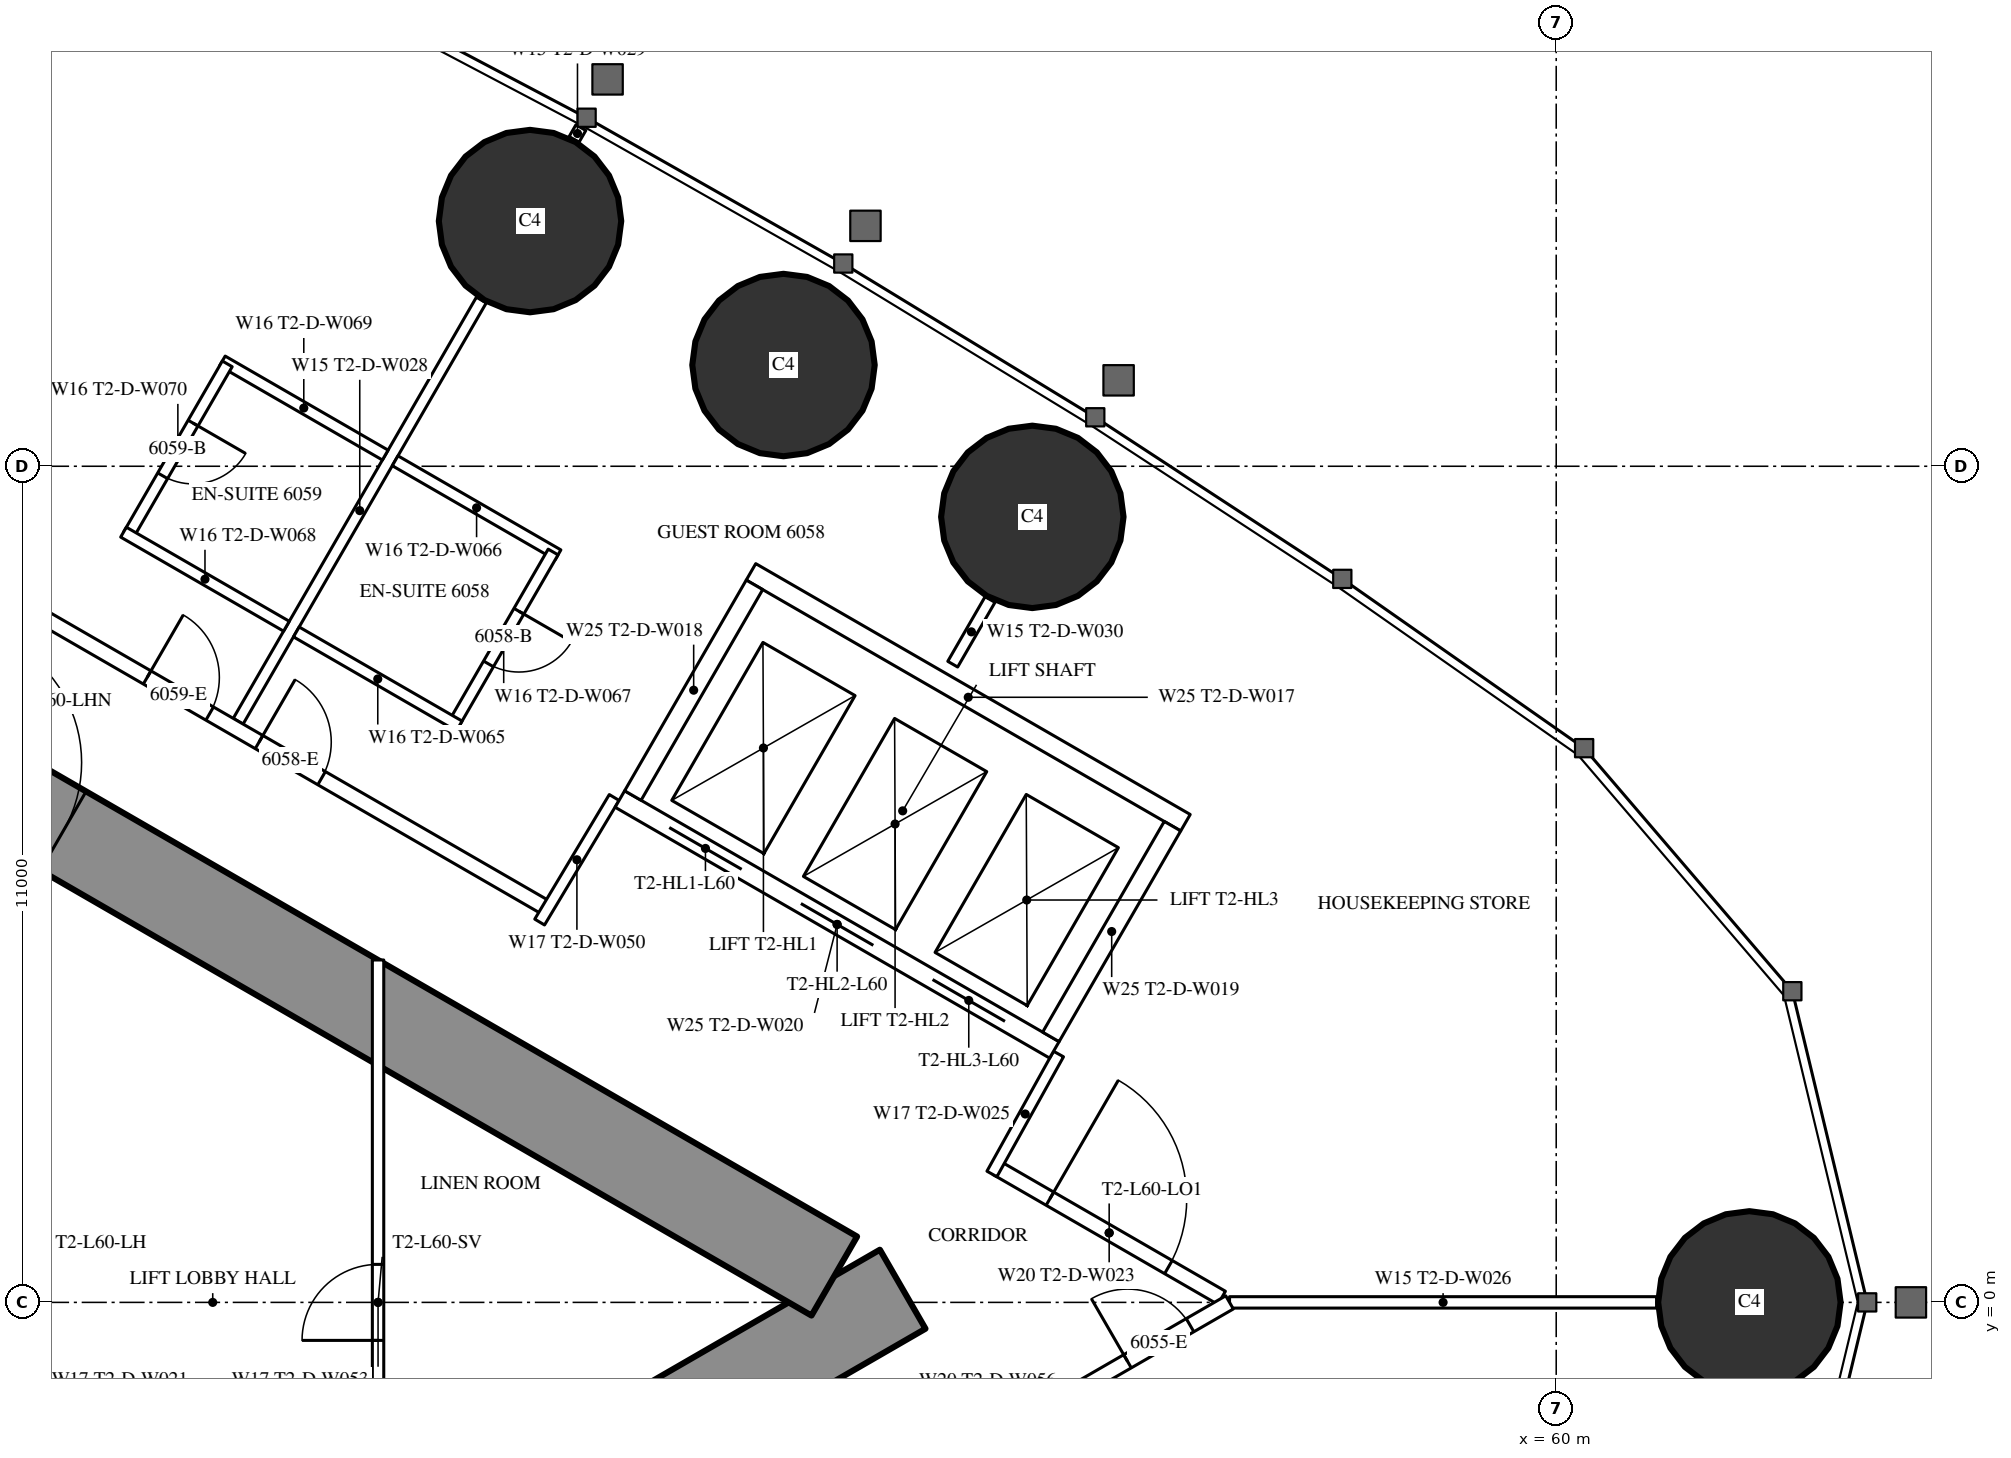
"""IFC4 building model, lengths in metres.
Left out: names, types, materials, properties, quantities, classifications, styles, units other than length and angle.
Written with IfcOpenShell. Run it as: python <this file> out.ifc"""

import sys

from ifc_helpers import new_model, si_unit, direction, frame, frame_2d, origin, origin_2d, place, context, subcontext, project, spatial, rectangle, circle, extrude, element, fill, save


model = new_model("IFC4")
c1 = context("Model", 3, precision=1e-05, world=origin(), true_north=direction((0.0, 1.0)))
c2 = subcontext(c1, "Body", "Model", "MODEL_VIEW")
j1 = project(units=[si_unit("LENGTHUNIT", "METRE"), si_unit("PLANEANGLEUNIT", "RADIAN")], contexts=[c1])
p1 = place(None, origin())
s1 = spatial("IfcSite", under=j1, at=p1, CompositionType="ELEMENT")
p2 = place(p1, origin())
s2 = spatial("IfcBuilding", under=s1, at=p2, CompositionType="ELEMENT")
p3 = place(p2, frame((0.0, 0.0, 226.1)))
s3 = spatial("IfcBuildingStorey", under=s2, at=p3, CompositionType="ELEMENT", Elevation=226.1)
for number, where, z_axis, x_axis in (
    (1, (62.542, 0.0, 0.0), (0.0, 0.0, 1.0), (1.0, 0.0, 0.0)),
    (2, (53.108, 10.334, 0.0), (0.0, 0.0, 1.0), (1.0, 0.0, 0.0)),
    (3, (49.834, 12.332, 0.0), (0.0, 0.0, 1.0), (1.0, 0.0, 0.0)),
    (4, (46.499, 14.226, 0.0), (0.0, 0.0, 1.0), (1.0, 0.0, 0.0)),
):
    element("IfcColumn", number, at=place(p3, frame(where, z_axis=z_axis, x_axis=x_axis)), inside=s3, PredefinedType="COLUMN", context=c2, shape_type="SweptSolid", body=[
        extrude(circle(Radius=1.2, at=origin_2d()), origin(), (0.0, 0.0, 1.0), 3.6),
    ])
p4 = place(p3, frame((27.2, -13.8, 0.0), z_axis=(0.0, 0.0, 1.0), x_axis=(0.866027159892, 0.499996958321, 0.0)))
e5 = element("IfcWall", 5, at=p4, inside=s3, PredefinedType="SHEAR", context=c2, shape_type="SweptSolid", body=[
    extrude(rectangle(XDim=27.947, YDim=1.2, at=frame_2d((13.973, 0.0))), origin(), (0.0, 0.0, 1.0), 3.6),
])
p5 = place(p4, frame((4.6, 0.0, 0.0)))
e6 = element("IfcOpeningElement", 6, at=p5, cuts=e5, PredefinedType="OPENING", context=c2, shape_type="SweptSolid", body=[
    extrude(rectangle(XDim=1.0, YDim=2.2, at=frame_2d((0.5, 1.1))), frame((0.0, 0.61, 0.0), z_axis=(0.0, -1.0, 0.0), x_axis=(1.0, 0.0, 0.0)), (0.0, 0.0, 1.0), 1.22),
])
p6 = place(p4, frame((13.395, 0.0, 0.0)))
e7 = element("IfcOpeningElement", 7, at=p6, cuts=e5, PredefinedType="OPENING", context=c2, shape_type="SweptSolid", body=[
    extrude(rectangle(XDim=1.8, YDim=2.2, at=frame_2d((0.9, 1.1))), frame((0.0, 0.61, 0.0), z_axis=(0.0, -1.0, 0.0), x_axis=(1.0, 0.0, 0.0)), (0.0, 0.0, 1.0), 1.22),
])
p7 = place(p3, frame((27.2, 13.8, 0.0), z_axis=(0.0, 0.0, 1.0), x_axis=(0.866024515034, -0.500001539357, 0.0)))
e8 = element("IfcWall", 8, at=p7, inside=s3, PredefinedType="SHEAR", context=c2, shape_type="SweptSolid", body=[
    extrude(rectangle(XDim=26.907, YDim=1.2, at=frame_2d((13.454, 0.0))), origin(), (0.0, 0.0, 1.0), 3.6),
])
p8 = place(p7, frame((4.6, 0.0, 0.0)))
e9 = element("IfcOpeningElement", 9, at=p8, cuts=e8, PredefinedType="OPENING", context=c2, shape_type="SweptSolid", body=[
    extrude(rectangle(XDim=1.0, YDim=2.2, at=frame_2d((0.5, 1.1))), frame((0.0, 0.61, 0.0), z_axis=(0.0, -1.0, 0.0), x_axis=(1.0, 0.0, 0.0)), (0.0, 0.0, 1.0), 1.22),
])
p9 = place(p7, frame((13.395, 0.0, 0.0)))
e10 = element("IfcOpeningElement", 10, at=p9, cuts=e8, PredefinedType="OPENING", context=c2, shape_type="SweptSolid", body=[
    extrude(rectangle(XDim=1.8, YDim=2.2, at=frame_2d((0.9, 1.1))), frame((0.0, 0.61, 0.0), z_axis=(0.0, -1.0, 0.0), x_axis=(1.0, 0.0, 0.0)), (0.0, 0.0, 1.0), 1.22),
])
p10 = place(p3, frame((42.66, 7.646, 0.0), z_axis=(0.0, 0.0, 1.0), x_axis=(0.499996592859, 0.866027370889, 0.0)))
e11 = element("IfcWall", 11, at=p10, inside=s3, PredefinedType="PARTITIONING", context=c2, shape_type="SweptSolid", body=[
    extrude(rectangle(XDim=6.398, YDim=0.15, at=frame_2d((3.199, 0.0))), origin(), (0.0, 0.0, 1.0), 2.45),
])
p11 = place(p3, frame((47.079, 15.3, 0.0), z_axis=(0.0, 0.0, 1.0), x_axis=(0.499212083968, 0.866479829667, 0.0)))
e12 = element("IfcWall", 12, at=p11, inside=s3, PredefinedType="PARTITIONING", context=c2, shape_type="SweptSolid", body=[
    extrude(rectangle(XDim=0.179, YDim=0.15, at=frame_2d((0.09, 0.0))), origin(), (0.0, 0.0, 1.0), 2.45),
])
p12 = place(p3, frame((55.702, 0.0, 0.0), z_axis=(0.0, 0.0, 1.0), x_axis=(1.0, 0.0, 0.0)))
e13 = element("IfcWall", 13, at=p12, inside=s3, PredefinedType="PARTITIONING", context=c2, shape_type="SweptSolid", body=[
    extrude(rectangle(XDim=5.619, YDim=0.15, at=frame_2d((2.81, 0.0))), origin(), (0.0, 0.0, 1.0), 2.45),
])
p13 = place(p3, frame((52.06, 8.396, 0.0), z_axis=(0.0, 0.0, 1.0), x_axis=(0.500095379624, 0.865970329329, 0.0)))
e14 = element("IfcWall", 14, at=p13, inside=s3, PredefinedType="PARTITIONING", context=c2, shape_type="SweptSolid", body=[
    extrude(rectangle(XDim=0.982, YDim=0.15, at=frame_2d((0.491, 0.0))), origin(), (0.0, 0.0, 1.0), 3.35),
])
p14 = place(p3, frame((28.959, 15.44, 0.0), z_axis=(0.0, 0.0, 1.0), x_axis=(0.866028936079, -0.499993881836, 0.0)))
e15 = element("IfcWall", 15, at=p14, inside=s3, PredefinedType="PARTITIONING", context=c2, shape_type="SweptSolid", body=[
    extrude(rectangle(XDim=20.503, YDim=0.2, at=frame_2d((10.251, 0.0))), origin(), (0.0, 0.0, 1.0), 3.35),
])
p15 = place(p14, frame((16.137, 0.0, 0.0)))
e16 = element("IfcOpeningElement", 16, at=p15, cuts=e15, PredefinedType="OPENING", context=c2, shape_type="SweptSolid", body=[
    extrude(rectangle(XDim=0.95, YDim=2.2, at=frame_2d((0.475, 1.1))), frame((0.0, 0.11, 0.0), z_axis=(0.0, -1.0, 0.0), x_axis=(1.0, 0.0, 0.0)), (0.0, 0.0, 1.0), 0.22),
])
p16 = place(p14, frame((14.437, 0.0, 0.0)))
e17 = element("IfcOpeningElement", 17, at=p16, cuts=e15, PredefinedType="OPENING", context=c2, shape_type="SweptSolid", body=[
    extrude(rectangle(XDim=0.95, YDim=2.2, at=frame_2d((0.475, 1.1))), frame((0.0, 0.11, 0.0), z_axis=(0.0, -1.0, 0.0), x_axis=(1.0, 0.0, 0.0)), (0.0, 0.0, 1.0), 0.22),
])
p17 = place(p14, frame((2.244, 0.0, 0.0)))
e18 = element("IfcOpeningElement", 18, at=p17, cuts=e15, PredefinedType="OPENING", context=c2, shape_type="SweptSolid", body=[
    extrude(rectangle(XDim=1.8, YDim=2.04, at=frame_2d((0.9, 1.02))), frame((0.0, 0.11, 0.0), z_axis=(0.0, -1.0, 0.0), x_axis=(1.0, 0.0, 0.0)), (0.0, 0.0, 1.0), 0.22),
])
p18 = place(p3, frame((52.639, 1.769, 0.0), z_axis=(0.0, 0.0, 1.0), x_axis=(0.866027340901, -0.4999966448, 0.0)))
e19 = element("IfcWall", 19, at=p18, inside=s3, PredefinedType="PARTITIONING", context=c2, shape_type="SweptSolid", body=[
    extrude(rectangle(XDim=3.417, YDim=0.2, at=frame_2d((1.708, 0.0))), origin(), (0.0, 0.0, 1.0), 3.35),
])
p19 = place(p18, frame((0.809, 0.0, 0.0)))
e20 = element("IfcOpeningElement", 20, at=p19, cuts=e19, PredefinedType="OPENING", context=c2, shape_type="SweptSolid", body=[
    extrude(rectangle(XDim=1.8, YDim=2.2, at=frame_2d((0.9, 1.1))), frame((0.0, 0.11, 0.0), z_axis=(0.0, -1.0, 0.0), x_axis=(1.0, 0.0, 0.0)), (0.0, 0.0, 1.0), 0.22),
])
p20 = place(p3, frame((47.606, 6.642, 0.0), z_axis=(0.0, 0.0, 1.0), x_axis=(-0.51353662755, -0.858067673418, 0.0)))
e21 = element("IfcWall", 21, at=p20, inside=s3, PredefinedType="PARTITIONING", context=c2, shape_type="SweptSolid", body=[
    extrude(rectangle(XDim=1.91, YDim=0.15, at=frame_2d((0.955, 0.0))), origin(), (0.0, 0.0, 1.0), 3.35),
])
p21 = place(p3, frame((52.576, 1.689, 0.0), z_axis=(0.0, 0.0, 1.0), x_axis=(0.485424724123, 0.874278466629, 0.0)))
e22 = element("IfcWall", 22, at=p21, inside=s3, PredefinedType="PARTITIONING", context=c2, shape_type="SweptSolid", body=[
    extrude(rectangle(XDim=1.805, YDim=0.15, at=frame_2d((0.903, 0.0))), origin(), (0.0, 0.0, 1.0), 3.35),
])
p22 = place(p3, frame((44.725, 11.072, 0.0), z_axis=(0.0, 0.0, 1.0), x_axis=(0.866006523861, -0.500032699561, 0.0)))
e23 = element("IfcWall", 23, at=p22, inside=s3, PredefinedType="PARTITIONING", context=c2, shape_type="SweptSolid", body=[
    extrude(rectangle(XDim=2.475, YDim=0.15, at=frame_2d((1.237, 0.0))), origin(), (0.0, 0.0, 1.0), 3.35),
])
p23 = place(p3, frame((45.503, 7.621, 0.0), z_axis=(0.0, 0.0, 1.0), x_axis=(0.500006934395, 0.866021400173, 0.0)))
e24 = element("IfcWall", 24, at=p23, inside=s3, PredefinedType="PARTITIONING", context=c2, shape_type="SweptSolid", body=[
    extrude(rectangle(XDim=2.6, YDim=0.15, at=frame_2d((1.3, 0.0))), origin(), (0.0, 0.0, 1.0), 3.35),
])
p24 = place(p23, frame((0.9, 0.0, 0.0)))
e25 = element("IfcOpeningElement", 25, at=p24, cuts=e24, PredefinedType="OPENING", context=c2, shape_type="SweptSolid", body=[
    extrude(rectangle(XDim=0.8, YDim=2.2, at=frame_2d((0.4, 1.1))), frame((0.0, 0.085, 0.0), z_axis=(0.0, -1.0, 0.0), x_axis=(1.0, 0.0, 0.0)), (0.0, 0.0, 1.0), 0.17),
])
p25 = place(p3, frame((43.425, 8.821, 0.0), z_axis=(0.0, 0.0, 1.0), x_axis=(0.866006523861, -0.500032699561, 0.0)))
e26 = element("IfcWall", 26, at=p25, inside=s3, PredefinedType="PARTITIONING", context=c2, shape_type="SweptSolid", body=[
    extrude(rectangle(XDim=2.475, YDim=0.15, at=frame_2d((1.237, 0.0))), origin(), (0.0, 0.0, 1.0), 2.5),
])
p26 = place(p3, frame((42.451, 12.385, 0.0), z_axis=(0.0, 0.0, 1.0), x_axis=(0.866031185235, -0.4999899861, 0.0)))
e27 = element("IfcWall", 27, at=p26, inside=s3, PredefinedType="PARTITIONING", context=c2, shape_type="SweptSolid", body=[
    extrude(rectangle(XDim=2.475, YDim=0.15, at=frame_2d((1.238, 0.0))), origin(), (0.0, 0.0, 1.0), 3.35),
])
p27 = place(p3, frame((41.216, 10.095, 0.0), z_axis=(0.0, 0.0, 1.0), x_axis=(0.499936506574, 0.866062058628, 0.0)))
e28 = element("IfcWall", 28, at=p27, inside=s3, PredefinedType="PARTITIONING", context=c2, shape_type="SweptSolid", body=[
    extrude(rectangle(XDim=2.6, YDim=0.15, at=frame_2d((1.3, 0.0))), origin(), (0.0, 0.0, 1.0), 3.35),
])
p28 = place(p27, frame((0.9, 0.0, 0.0)))
e29 = element("IfcOpeningElement", 29, at=p28, cuts=e28, PredefinedType="OPENING", context=c2, shape_type="SweptSolid", body=[
    extrude(rectangle(XDim=0.8, YDim=2.2, at=frame_2d((0.4, 1.1))), frame((0.0, 0.085, 0.0), z_axis=(0.0, -1.0, 0.0), x_axis=(1.0, 0.0, 0.0)), (0.0, 0.0, 1.0), 0.17),
])
p29 = place(p3, frame((41.151, 10.133, 0.0), z_axis=(0.0, 0.0, 1.0), x_axis=(0.866006523861, -0.500032699561, 0.0)))
e30 = element("IfcWall", 30, at=p29, inside=s3, PredefinedType="PARTITIONING", context=c2, shape_type="SweptSolid", body=[
    extrude(rectangle(XDim=2.475, YDim=0.15, at=frame_2d((1.237, 0.0))), origin(), (0.0, 0.0, 1.0), 2.5),
])
p30 = place(p3, frame((49.335, -3.676, 0.0), z_axis=(0.0, 0.0, 1.0), x_axis=(0.866021344046, 0.500007031608, 0.0)))
e31 = element("IfcWall", 31, at=p30, inside=s3, PredefinedType="PARTITIONING", context=c2, shape_type="SweptSolid", body=[
    extrude(rectangle(XDim=7.352, YDim=0.2, at=frame_2d((3.676, 0.0))), origin(), (0.0, 0.0, 1.0), 3.35),
])
p31 = place(p30, frame((5.802, 0.0, 0.0)))
e32 = element("IfcOpeningElement", 32, at=p31, cuts=e31, PredefinedType="OPENING", context=c2, shape_type="SweptSolid", body=[
    extrude(rectangle(XDim=0.95, YDim=2.2, at=frame_2d((0.475, 1.1))), frame((0.0, 0.11, 0.0), z_axis=(0.0, -1.0, 0.0), x_axis=(1.0, 0.0, 0.0)), (0.0, 0.0, 1.0), 0.22),
])
p32 = place(p3, frame((44.5, -4.505, 0.0), z_axis=(0.0, 0.0, 1.0), x_axis=(0.0, 1.0, 0.0)))
e33 = element("IfcWall", 33, at=p32, inside=s3, PredefinedType="PARTITIONING", context=c2, shape_type="SweptSolid", body=[
    extrude(rectangle(XDim=9.009, YDim=0.15, at=frame_2d((4.505, 0.0))), origin(), (0.0, 0.0, 1.0), 3.35),
])
p33 = place(p32, frame((4.005, 0.0, 0.0)))
e34 = element("IfcOpeningElement", 34, at=p33, cuts=e33, PredefinedType="OPENING", context=c2, shape_type="SweptSolid", body=[
    extrude(rectangle(XDim=1.0, YDim=2.2, at=frame_2d((0.5, 1.1))), frame((0.0, 0.085, 0.0), z_axis=(0.0, -1.0, 0.0), x_axis=(1.0, 0.0, 0.0)), (0.0, 0.0, 1.0), 0.17),
])
p34 = place(p3, frame((47.681, 6.622, 0.0), z_axis=(0.0, 0.0, 1.0), x_axis=(0.86603344179, -0.499986077507, 0.0)))
e35 = element("IfcWall", 35, at=p34, inside=s3, PredefinedType="PARTITIONING", context=c2, shape_type="SweptSolid", body=[
    extrude(rectangle(XDim=6.6, YDim=0.25, at=frame_2d((3.3, 0.0))), origin(), (0.0, 0.0, 1.0), 3.35),
])
p35 = place(p34, frame((0.75, 0.0, 0.0)))
e36 = element("IfcOpeningElement", 36, at=p35, cuts=e35, PredefinedType="OPENING", context=c2, shape_type="SweptSolid", body=[
    extrude(rectangle(XDim=1.1, YDim=2.2, at=frame_2d((0.55, 1.1))), frame((0.0, 0.135, 0.0), z_axis=(0.0, -1.0, 0.0), x_axis=(1.0, 0.0, 0.0)), (0.0, 0.0, 1.0), 0.27),
])
p36 = place(p34, frame((2.75, 0.0, 0.0)))
e37 = element("IfcOpeningElement", 37, at=p36, cuts=e35, PredefinedType="OPENING", context=c2, shape_type="SweptSolid", body=[
    extrude(rectangle(XDim=1.1, YDim=2.2, at=frame_2d((0.55, 1.1))), frame((0.0, 0.135, 0.0), z_axis=(0.0, -1.0, 0.0), x_axis=(1.0, 0.0, 0.0)), (0.0, 0.0, 1.0), 0.27),
])
p37 = place(p34, frame((4.75, 0.0, 0.0)))
e38 = element("IfcOpeningElement", 38, at=p37, cuts=e35, PredefinedType="OPENING", context=c2, shape_type="SweptSolid", body=[
    extrude(rectangle(XDim=1.1, YDim=2.2, at=frame_2d((0.55, 1.1))), frame((0.0, 0.135, 0.0), z_axis=(0.0, -1.0, 0.0), x_axis=(1.0, 0.0, 0.0)), (0.0, 0.0, 1.0), 0.27),
])
p38 = place(p3, frame((49.406, 9.611, 0.0), z_axis=(0.0, 0.0, 1.0), x_axis=(0.86603344179, -0.499986077507, 0.0)))
e39 = element("IfcWall", 39, at=p38, inside=s3, PredefinedType="PARTITIONING", context=c2, shape_type="SweptSolid", body=[
    extrude(rectangle(XDim=6.6, YDim=0.25, at=frame_2d((3.3, 0.0))), origin(), (0.0, 0.0, 1.0), 3.35),
])
p39 = place(p3, frame((47.852, 6.668, 0.0), z_axis=(0.0, 0.0, 1.0), x_axis=(0.499929347863, 0.866066190972, 0.0)))
e40 = element("IfcWall", 40, at=p39, inside=s3, PredefinedType="PARTITIONING", context=c2, shape_type="SweptSolid", body=[
    extrude(rectangle(XDim=3.201, YDim=0.25, at=frame_2d((1.6, 0.0))), origin(), (0.0, 0.0, 1.0), 3.35),
])
p40 = place(p3, frame((53.352, 3.493, 0.0), z_axis=(0.0, 0.0, 1.0), x_axis=(0.499872130319, 0.866099216793, 0.0)))
e41 = element("IfcWall", 41, at=p40, inside=s3, PredefinedType="PARTITIONING", context=c2, shape_type="SweptSolid", body=[
    extrude(rectangle(XDim=3.2, YDim=0.25, at=frame_2d((1.6, 0.0))), origin(), (0.0, 0.0, 1.0), 3.35),
])
p41 = place(p31, origin())
e42 = element("IfcDoor", 42, at=p41, inside=s3, OperationType="SINGLE_SWING_LEFT", PredefinedType="DOOR", context=c2, shape_type="SweptSolid", body=[
    extrude(rectangle(XDim=0.95, YDim=2.2, at=frame_2d((0.475, 1.1))), frame((0.0, 0.025, 0.0), z_axis=(0.0, -1.0, 0.0), x_axis=(1.0, 0.0, 0.0)), (0.0, 0.0, 1.0), 0.05),
])
fill(e32, e42)
p42 = place(p24, origin())
e43 = element("IfcDoor", 43, at=p42, inside=s3, OperationType="SINGLE_SWING_RIGHT", PredefinedType="DOOR", context=c2, shape_type="SweptSolid", body=[
    extrude(rectangle(XDim=0.8, YDim=2.2, at=frame_2d((0.4, 1.1))), frame((0.0, 0.025, 0.0), z_axis=(0.0, -1.0, 0.0), x_axis=(1.0, 0.0, 0.0)), (0.0, 0.0, 1.0), 0.05),
])
fill(e25, e43)
p43 = place(p15, origin())
e44 = element("IfcDoor", 44, at=p43, inside=s3, OperationType="SINGLE_SWING_LEFT", PredefinedType="DOOR", context=c2, shape_type="SweptSolid", body=[
    extrude(rectangle(XDim=0.95, YDim=2.2, at=frame_2d((0.475, 1.1))), frame((0.0, 0.025, 0.0), z_axis=(0.0, -1.0, 0.0), x_axis=(1.0, 0.0, 0.0)), (0.0, 0.0, 1.0), 0.05),
])
fill(e16, e44)
p44 = place(p28, origin())
e45 = element("IfcDoor", 45, at=p44, inside=s3, OperationType="SINGLE_SWING_RIGHT", PredefinedType="DOOR", context=c2, shape_type="SweptSolid", body=[
    extrude(rectangle(XDim=0.8, YDim=2.2, at=frame_2d((0.4, 1.1))), frame((0.0, 0.025, 0.0), z_axis=(0.0, -1.0, 0.0), x_axis=(1.0, 0.0, 0.0)), (0.0, 0.0, 1.0), 0.05),
])
fill(e29, e45)
p45 = place(p16, origin())
e46 = element("IfcDoor", 46, at=p45, inside=s3, OperationType="SINGLE_SWING_LEFT", PredefinedType="DOOR", context=c2, shape_type="SweptSolid", body=[
    extrude(rectangle(XDim=0.95, YDim=2.2, at=frame_2d((0.475, 1.1))), frame((0.0, 0.025, 0.0), z_axis=(0.0, -1.0, 0.0), x_axis=(1.0, 0.0, 0.0)), (0.0, 0.0, 1.0), 0.05),
])
fill(e17, e46)
p46 = place(p19, origin())
e47 = element("IfcDoor", 47, at=p46, inside=s3, OperationType="DOUBLE_DOOR_SINGLE_SWING", PredefinedType="DOOR", context=c2, shape_type="SweptSolid", body=[
    extrude(rectangle(XDim=1.8, YDim=2.2, at=frame_2d((0.9, 1.1))), frame((0.0, 0.025, 0.0), z_axis=(0.0, -1.0, 0.0), x_axis=(1.0, 0.0, 0.0)), (0.0, 0.0, 1.0), 0.05),
])
fill(e20, e47)
p47 = place(p33, origin())
e48 = element("IfcDoor", 48, at=p47, inside=s3, OperationType="SINGLE_SWING_LEFT", PredefinedType="DOOR", context=c2, shape_type="SweptSolid", body=[
    extrude(rectangle(XDim=1.0, YDim=2.2, at=frame_2d((0.5, 1.1))), frame((0.0, 0.025, 0.0), z_axis=(0.0, -1.0, 0.0), x_axis=(1.0, 0.0, 0.0)), (0.0, 0.0, 1.0), 0.05),
])
fill(e34, e48)
p48 = place(p9, origin())
e49 = element("IfcDoor", 49, at=p48, inside=s3, OperationType="DOUBLE_DOOR_SINGLE_SWING", PredefinedType="DOOR", context=c2, shape_type="SweptSolid", body=[
    extrude(rectangle(XDim=1.8, YDim=2.2, at=frame_2d((0.9, 1.1))), frame((0.0, 0.025, 0.0), z_axis=(0.0, -1.0, 0.0), x_axis=(1.0, 0.0, 0.0)), (0.0, 0.0, 1.0), 0.05),
])
fill(e10, e49)
p49 = place(p35, origin())
e50 = element("IfcDoor", 50, at=p49, inside=s3, OperationType="DOUBLE_DOOR_SLIDING", PredefinedType="USERDEFINED", context=c2, shape_type="SweptSolid", body=[
    extrude(rectangle(XDim=1.1, YDim=2.2, at=frame_2d((0.55, 1.1))), frame((0.0, 0.025, 0.0), z_axis=(0.0, -1.0, 0.0), x_axis=(1.0, 0.0, 0.0)), (0.0, 0.0, 1.0), 0.05),
])
fill(e36, e50)
p50 = place(p36, origin())
e51 = element("IfcDoor", 51, at=p50, inside=s3, OperationType="DOUBLE_DOOR_SLIDING", PredefinedType="USERDEFINED", context=c2, shape_type="SweptSolid", body=[
    extrude(rectangle(XDim=1.1, YDim=2.2, at=frame_2d((0.55, 1.1))), frame((0.0, 0.025, 0.0), z_axis=(0.0, -1.0, 0.0), x_axis=(1.0, 0.0, 0.0)), (0.0, 0.0, 1.0), 0.05),
])
fill(e37, e51)
p51 = place(p37, origin())
e52 = element("IfcDoor", 52, at=p51, inside=s3, OperationType="DOUBLE_DOOR_SLIDING", PredefinedType="USERDEFINED", context=c2, shape_type="SweptSolid", body=[
    extrude(rectangle(XDim=1.1, YDim=2.2, at=frame_2d((0.55, 1.1))), frame((0.0, 0.025, 0.0), z_axis=(0.0, -1.0, 0.0), x_axis=(1.0, 0.0, 0.0)), (0.0, 0.0, 1.0), 0.05),
])
fill(e38, e52)
save(model, sys.argv[1])
